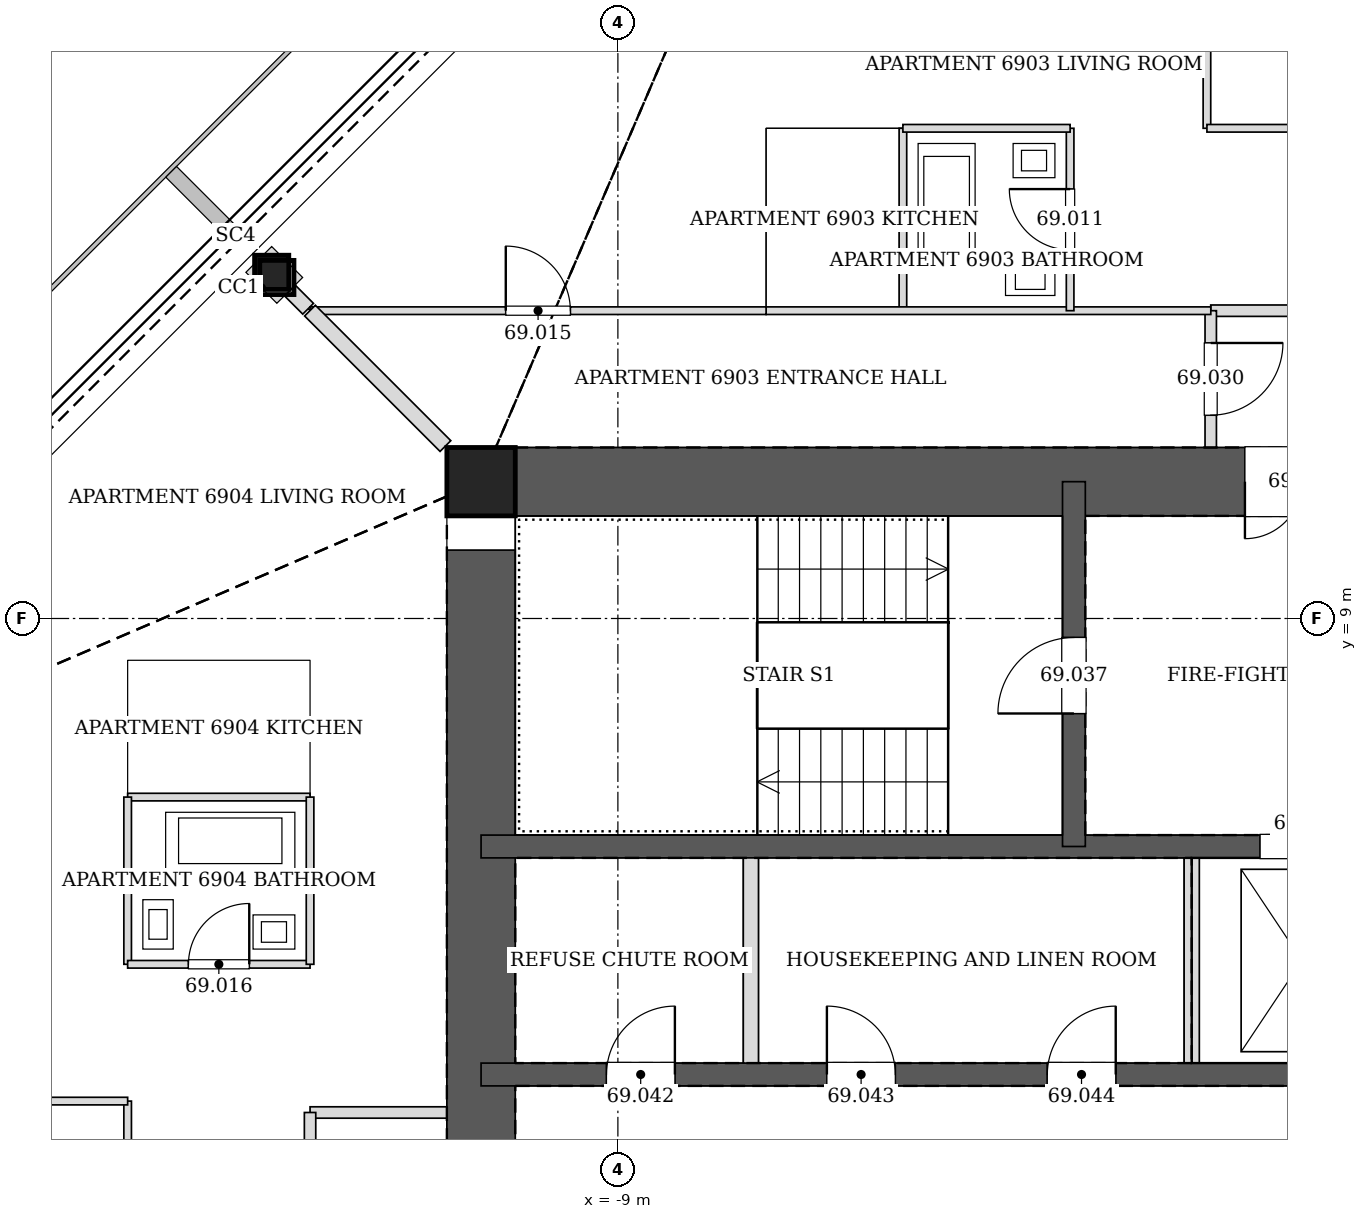
"""IFC4 building model, lengths in metres.
Left out: names, types, materials, properties, quantities, classifications, styles, units other than length and angle.
Written with IfcOpenShell. Run it as: python <this file> out.ifc"""

import sys

from ifc_helpers import new_model, si_unit, direction, frame, frame_2d, origin, origin_2d, place, context, subcontext, project, spatial, rectangle, hollow_rectangle, extrude, element, fill, save


model = new_model("IFC4")
c1 = context("Model", 3, precision=1e-05, world=origin(), true_north=direction((0.0, 1.0)))
c2 = subcontext(c1, "Body", "Model", "MODEL_VIEW")
j1 = project(units=[si_unit("LENGTHUNIT", "METRE"), si_unit("PLANEANGLEUNIT", "RADIAN")], contexts=[c1])
p1 = place(None, origin())
s1 = spatial("IfcSite", under=j1, at=p1, CompositionType="ELEMENT")
p2 = place(p1, origin())
s2 = spatial("IfcBuilding", under=s1, at=p2, CompositionType="ELEMENT")
p3 = place(p2, frame((0.0, 0.0, 284.4)))
s3 = spatial("IfcBuildingStorey", under=s2, at=p3, CompositionType="ELEMENT", Elevation=284.4)
p4 = place(p3, frame((-13.555, 13.555, 0.0), z_axis=(0.020024994503, -0.020024994503, 0.999598919162), x_axis=(0.707106781187, 0.707106781187, 0.0)))
e1 = element("IfcColumn", 1, at=p4, inside=s3, PredefinedType="COLUMN", context=c2, shape_type="SweptSolid", body=[
    extrude(hollow_rectangle(XDim=0.45, YDim=0.45, WallThickness=0.02, at=origin_2d()), origin(), (0.0, 0.0, 1.0), 3.402),
])
p5 = place(p3, frame((-10.8, 10.8, 0.0), z_axis=(0.0, 0.0, 1.0), x_axis=(1.0, 0.0, 0.0)))
e2 = element("IfcColumn", 2, at=p5, inside=s3, PredefinedType="COLUMN", context=c2, shape_type="SweptSolid", body=[
    extrude(hollow_rectangle(XDim=0.9, YDim=0.9, WallThickness=0.04, at=origin_2d()), origin(), (0.0, 0.0, 1.0), 3.4),
])
p6 = place(p3, frame((10.8, 10.8, 0.0), z_axis=(0.0, 0.0, 1.0), x_axis=(-1.0, 0.0, 0.0)))
e3 = element("IfcWall", 3, at=p6, inside=s3, PredefinedType="SOLIDWALL", context=c2, shape_type="SweptSolid", body=[
    extrude(rectangle(XDim=21.6, YDim=0.9, at=frame_2d((10.8, 0.0))), origin(), (0.0, 0.0, 1.0), 3.4),
])
p7 = place(p6, frame((10.05, 0.0, 0.0)))
e4 = element("IfcOpeningElement", 4, at=p7, cuts=e3, PredefinedType="OPENING", context=c2, shape_type="SweptSolid", body=[
    extrude(rectangle(XDim=1.5, YDim=2.1, at=frame_2d((0.75, 1.05))), frame((0.0, 0.46, 0.0), z_axis=(0.0, -1.0, 0.0), x_axis=(1.0, 0.0, 0.0)), (0.0, 0.0, 1.0), 0.92),
])
p8 = place(p3, frame((-10.8, 10.8, 0.0), z_axis=(0.0, 0.0, 1.0), x_axis=(0.0, -1.0, 0.0)))
e5 = element("IfcWall", 5, at=p8, inside=s3, PredefinedType="SOLIDWALL", context=c2, shape_type="SweptSolid", body=[
    extrude(rectangle(XDim=21.6, YDim=0.9, at=frame_2d((10.8, 0.0))), origin(), (0.0, 0.0, 1.0), 3.4),
])
p9 = place(p8, frame((8.7, 0.0, 0.0)))
e6 = element("IfcOpeningElement", 6, at=p9, cuts=e5, PredefinedType="OPENING", context=c2, shape_type="SweptSolid", body=[
    extrude(rectangle(XDim=1.2, YDim=2.1, at=frame_2d((0.6, 1.05))), frame((0.0, 0.46, 0.0), z_axis=(0.0, -1.0, 0.0), x_axis=(1.0, 0.0, 0.0)), (0.0, 0.0, 1.0), 0.92),
])
p10 = place(p8, frame((11.7, 0.0, 0.0)))
e7 = element("IfcOpeningElement", 7, at=p10, cuts=e5, PredefinedType="OPENING", context=c2, shape_type="SweptSolid", body=[
    extrude(rectangle(XDim=1.2, YDim=2.1, at=frame_2d((0.6, 1.05))), frame((0.0, 0.46, 0.0), z_axis=(0.0, -1.0, 0.0), x_axis=(1.0, 0.0, 0.0)), (0.0, 0.0, 1.0), 0.92),
])
p11 = place(p3, frame((-10.8, 3.0, 0.0), z_axis=(0.0, 0.0, 1.0), x_axis=(1.0, 0.0, 0.0)))
e8 = element("IfcWall", 8, at=p11, inside=s3, PredefinedType="SOLIDWALL", context=c2, shape_type="SweptSolid", body=[
    extrude(rectangle(XDim=21.6, YDim=0.3, at=frame_2d((10.8, 0.0))), origin(), (0.0, 0.0, 1.0), 3.4),
])
p12 = place(p11, frame((1.65, 0.0, 0.0)))
e9 = element("IfcOpeningElement", 9, at=p12, cuts=e8, PredefinedType="OPENING", context=c2, shape_type="SweptSolid", body=[
    extrude(rectangle(XDim=0.9, YDim=2.1, at=frame_2d((0.45, 1.05))), frame((0.0, 0.16, 0.0), z_axis=(0.0, -1.0, 0.0), x_axis=(1.0, 0.0, 0.0)), (0.0, 0.0, 1.0), 0.32),
])
p13 = place(p11, frame((4.55, 0.0, 0.0)))
e10 = element("IfcOpeningElement", 10, at=p13, cuts=e8, PredefinedType="OPENING", context=c2, shape_type="SweptSolid", body=[
    extrude(rectangle(XDim=0.9, YDim=2.1, at=frame_2d((0.45, 1.05))), frame((0.0, 0.16, 0.0), z_axis=(0.0, -1.0, 0.0), x_axis=(1.0, 0.0, 0.0)), (0.0, 0.0, 1.0), 0.32),
])
p14 = place(p11, frame((7.45, 0.0, 0.0)))
e11 = element("IfcOpeningElement", 11, at=p14, cuts=e8, PredefinedType="OPENING", context=c2, shape_type="SweptSolid", body=[
    extrude(rectangle(XDim=0.9, YDim=2.1, at=frame_2d((0.45, 1.05))), frame((0.0, 0.16, 0.0), z_axis=(0.0, -1.0, 0.0), x_axis=(1.0, 0.0, 0.0)), (0.0, 0.0, 1.0), 0.32),
])
p15 = place(p11, frame((13.25, 0.0, 0.0)))
e12 = element("IfcOpeningElement", 12, at=p15, cuts=e8, PredefinedType="OPENING", context=c2, shape_type="SweptSolid", body=[
    extrude(rectangle(XDim=0.9, YDim=2.1, at=frame_2d((0.45, 1.05))), frame((0.0, 0.16, 0.0), z_axis=(0.0, -1.0, 0.0), x_axis=(1.0, 0.0, 0.0)), (0.0, 0.0, 1.0), 0.32),
])
p16 = place(p11, frame((16.15, 0.0, 0.0)))
e13 = element("IfcOpeningElement", 13, at=p16, cuts=e8, PredefinedType="OPENING", context=c2, shape_type="SweptSolid", body=[
    extrude(rectangle(XDim=0.9, YDim=2.1, at=frame_2d((0.45, 1.05))), frame((0.0, 0.16, 0.0), z_axis=(0.0, -1.0, 0.0), x_axis=(1.0, 0.0, 0.0)), (0.0, 0.0, 1.0), 0.32),
])
p17 = place(p11, frame((19.05, 0.0, 0.0)))
e14 = element("IfcOpeningElement", 14, at=p17, cuts=e8, PredefinedType="OPENING", context=c2, shape_type="SweptSolid", body=[
    extrude(rectangle(XDim=0.9, YDim=2.1, at=frame_2d((0.45, 1.05))), frame((0.0, 0.16, 0.0), z_axis=(0.0, -1.0, 0.0), x_axis=(1.0, 0.0, 0.0)), (0.0, 0.0, 1.0), 0.32),
])
p18 = place(p3, frame((-10.8, 6.0, 0.0), z_axis=(0.0, 0.0, 1.0), x_axis=(1.0, 0.0, 0.0)))
e15 = element("IfcWall", 15, at=p18, inside=s3, PredefinedType="SOLIDWALL", context=c2, shape_type="SweptSolid", body=[
    extrude(rectangle(XDim=21.6, YDim=0.3, at=frame_2d((10.8, 0.0))), origin(), (0.0, 0.0, 1.0), 3.4),
])
p19 = place(p18, frame((10.25, 0.0, 0.0)))
e16 = element("IfcOpeningElement", 16, at=p19, cuts=e15, PredefinedType="OPENING", context=c2, shape_type="SweptSolid", body=[
    extrude(rectangle(XDim=1.1, YDim=2.1, at=frame_2d((0.55, 1.05))), frame((0.0, 0.16, 0.0), z_axis=(0.0, -1.0, 0.0), x_axis=(1.0, 0.0, 0.0)), (0.0, 0.0, 1.0), 0.32),
])
p20 = place(p3, frame((-3.0, 6.0, 0.0), z_axis=(0.0, 0.0, 1.0), x_axis=(0.0, 1.0, 0.0)))
e17 = element("IfcWall", 17, at=p20, inside=s3, PredefinedType="SOLIDWALL", context=c2, shape_type="SweptSolid", body=[
    extrude(rectangle(XDim=4.8, YDim=0.3, at=frame_2d((2.4, 0.0))), origin(), (0.0, 0.0, 1.0), 3.4),
])
p21 = place(p20, frame((1.75, 0.0, 0.0)))
e18 = element("IfcOpeningElement", 18, at=p21, cuts=e17, PredefinedType="OPENING", context=c2, shape_type="SweptSolid", body=[
    extrude(rectangle(XDim=1.0, YDim=2.1, at=frame_2d((0.5, 1.05))), frame((0.0, 0.16, 0.0), z_axis=(0.0, -1.0, 0.0), x_axis=(1.0, 0.0, 0.0)), (0.0, 0.0, 1.0), 0.32),
])
p22 = place(p3, frame((6.751, 13.05, 0.0), z_axis=(0.0, 0.0, 1.0), x_axis=(-1.0, 0.0, 0.0)))
e19 = element("IfcWall", 19, at=p22, inside=s3, PredefinedType="PARTITIONING", context=c2, shape_type="SweptSolid", body=[
    extrude(rectangle(XDim=7.951, YDim=0.15, at=frame_2d((3.976, 0.0))), origin(), (0.0, 0.0, 1.0), 2.349),
])
p23 = place(p3, frame((-1.2, 13.05, 0.0), z_axis=(0.0, 0.0, 1.0), x_axis=(0.0, -1.0, 0.0)))
e20 = element("IfcWall", 20, at=p23, inside=s3, PredefinedType="PARTITIONING", context=c2, shape_type="SweptSolid", body=[
    extrude(rectangle(XDim=1.8, YDim=0.15, at=frame_2d((0.9, 0.0))), origin(), (0.0, 0.0, 1.0), 3.2),
])
p24 = place(p23, frame((0.425, 0.0, 0.0)))
e21 = element("IfcOpeningElement", 21, at=p24, cuts=e20, PredefinedType="OPENING", context=c2, shape_type="SweptSolid", body=[
    extrude(rectangle(XDim=0.95, YDim=2.1, at=frame_2d((0.475, 1.05))), frame((0.0, 0.085, 0.0), z_axis=(0.0, -1.0, 0.0), x_axis=(1.0, 0.0, 0.0)), (0.0, 0.0, 1.0), 0.17),
])
p25 = place(p3, frame((-11.25, 2.5, 0.0), z_axis=(0.0, 0.0, 1.0), x_axis=(-1.0, 0.0, 0.0)))
e22 = element("IfcWall", 22, at=p25, inside=s3, PredefinedType="PARTITIONING", context=c2, shape_type="SweptSolid", body=[
    extrude(rectangle(XDim=1.8, YDim=0.15, at=frame_2d((0.9, 0.0))), origin(), (0.0, 0.0, 1.0), 3.2),
])
p26 = place(p3, frame((-13.05, 2.5, 0.0), z_axis=(0.0, 0.0, 1.0), x_axis=(0.0, -1.0, 0.0)))
e23 = element("IfcWall", 23, at=p26, inside=s3, PredefinedType="PARTITIONING", context=c2, shape_type="SweptSolid", body=[
    extrude(rectangle(XDim=3.251, YDim=0.15, at=frame_2d((1.625, 0.0))), origin(), (0.0, 0.0, 1.0), 2.349),
])
p27 = place(p26, frame((1.15, 0.0, 0.0)))
e24 = element("IfcOpeningElement", 24, at=p27, cuts=e23, PredefinedType="OPENING", context=c2, shape_type="SweptSolid", body=[
    extrude(rectangle(XDim=0.95, YDim=2.1, at=frame_2d((0.475, 1.05))), frame((0.0, 0.085, 0.0), z_axis=(0.0, -1.0, 0.0), x_axis=(1.0, 0.0, 0.0)), (0.0, 0.0, 1.0), 0.17),
])
p28 = place(p3, frame((-5.25, 13.05, 0.0), z_axis=(0.0, 0.0, 1.0), x_axis=(0.0, 1.0, 0.0)))
e25 = element("IfcWall", 25, at=p28, inside=s3, PredefinedType="PARTITIONING", context=c2, shape_type="SweptSolid", body=[
    extrude(rectangle(XDim=2.4, YDim=0.1, at=frame_2d((1.2, 0.0))), origin(), (0.0, 0.0, 1.0), 2.591),
])
p29 = place(p3, frame((-7.05, 13.05, 0.0), z_axis=(0.0, 0.0, 1.0), x_axis=(1.0, 0.0, 0.0)))
e26 = element("IfcWall", 26, at=p29, inside=s3, PredefinedType="PARTITIONING", context=c2, shape_type="SweptSolid", body=[
    extrude(rectangle(XDim=5.851, YDim=0.1, at=frame_2d((2.926, 0.0))), origin(), (0.0, 0.0, 1.0), 3.2),
])
p30 = place(p3, frame((-3.05, 13.05, 0.0), z_axis=(0.0, 0.0, 1.0), x_axis=(0.0, 1.0, 0.0)))
e27 = element("IfcWall", 27, at=p30, inside=s3, PredefinedType="PARTITIONING", context=c2, shape_type="SweptSolid", body=[
    extrude(rectangle(XDim=2.4, YDim=0.1, at=frame_2d((1.2, 0.0))), origin(), (0.0, 0.0, 1.0), 2.591),
])
p31 = place(p30, frame((0.8, 0.0, 0.0)))
e28 = element("IfcOpeningElement", 28, at=p31, cuts=e27, PredefinedType="OPENING", context=c2, shape_type="SweptSolid", body=[
    extrude(rectangle(XDim=0.8, YDim=2.1, at=frame_2d((0.4, 1.05))), frame((0.0, 0.06, 0.0), z_axis=(0.0, -1.0, 0.0), x_axis=(1.0, 0.0, 0.0)), (0.0, 0.0, 1.0), 0.12),
])
p32 = place(p3, frame((-3.05, 15.45, 0.0), z_axis=(0.0, 0.0, 1.0), x_axis=(-1.0, 0.0, 0.0)))
e29 = element("IfcWall", 29, at=p32, inside=s3, PredefinedType="PARTITIONING", context=c2, shape_type="SweptSolid", body=[
    extrude(rectangle(XDim=2.2, YDim=0.1, at=frame_2d((1.1, 0.0))), origin(), (0.0, 0.0, 1.0), 3.2),
])
p33 = place(p3, frame((-1.25, 19.953, 0.0), z_axis=(0.0, 0.0, 1.0), x_axis=(0.0, -1.0, 0.0)))
e30 = element("IfcWall", 30, at=p33, inside=s3, PredefinedType="PARTITIONING", context=c2, shape_type="SweptSolid", body=[
    extrude(rectangle(XDim=4.503, YDim=0.1, at=frame_2d((2.252, 0.0))), origin(), (0.0, 0.0, 1.0), 2.591),
])
p34 = place(p33, frame((1.689, 0.0, 0.0)))
e31 = element("IfcOpeningElement", 31, at=p34, cuts=e30, PredefinedType="OPENING", context=c2, shape_type="SweptSolid", body=[
    extrude(rectangle(XDim=0.85, YDim=2.1, at=frame_2d((0.425, 1.05))), frame((0.0, 0.06, 0.0), z_axis=(0.0, -1.0, 0.0), x_axis=(1.0, 0.0, 0.0)), (0.0, 0.0, 1.0), 0.12),
])
p35 = place(p3, frame((-1.25, 15.45, 0.0), z_axis=(0.0, 0.0, 1.0), x_axis=(1.0, 0.0, 0.0)))
e32 = element("IfcWall", 32, at=p35, inside=s3, PredefinedType="PARTITIONING", context=c2, shape_type="SweptSolid", body=[
    extrude(rectangle(XDim=4.0, YDim=0.1, at=frame_2d((2.0, 0.0))), origin(), (0.0, 0.0, 1.0), 2.349),
])
p36 = place(p3, frame((-13.314, 13.314, 0.0), z_axis=(0.0, 0.0, 1.0), x_axis=(0.707106781187, -0.707106781187, 0.0)))
e33 = element("IfcWall", 33, at=p36, inside=s3, PredefinedType="PARTITIONING", context=c2, shape_type="SweptSolid", body=[
    extrude(rectangle(XDim=0.338, YDim=0.2, at=frame_2d((0.169, 0.0))), origin(), (0.0, 0.0, 1.0), 2.591),
])
p37 = place(p3, frame((-13.05, 13.05, 0.0), z_axis=(0.0, 0.0, 1.0), x_axis=(1.0, 0.0, 0.0)))
e34 = element("IfcWall", 34, at=p37, inside=s3, PredefinedType="PARTITIONING", context=c2, shape_type="SweptSolid", body=[
    extrude(rectangle(XDim=6.0, YDim=0.1, at=frame_2d((3.0, 0.0))), origin(), (0.0, 0.0, 1.0), 2.497),
])
p38 = place(p37, frame((2.575, 0.0, 0.0)))
e35 = element("IfcOpeningElement", 35, at=p38, cuts=e34, PredefinedType="OPENING", context=c2, shape_type="SweptSolid", body=[
    extrude(rectangle(XDim=0.85, YDim=2.1, at=frame_2d((0.425, 1.05))), frame((0.0, 0.06, 0.0), z_axis=(0.0, -1.0, 0.0), x_axis=(1.0, 0.0, 0.0)), (0.0, 0.0, 1.0), 0.12),
])
p39 = place(p3, frame((-15.45, 6.65, 0.0), z_axis=(0.0, 0.0, 1.0), x_axis=(1.0, 0.0, 0.0)))
e36 = element("IfcWall", 36, at=p39, inside=s3, PredefinedType="PARTITIONING", context=c2, shape_type="SweptSolid", body=[
    extrude(rectangle(XDim=2.4, YDim=0.1, at=frame_2d((1.2, 0.0))), origin(), (0.0, 0.0, 1.0), 2.591),
])
p40 = place(p3, frame((-15.45, 6.65, 0.0), z_axis=(0.0, 0.0, 1.0), x_axis=(0.0, -1.0, 0.0)))
e37 = element("IfcWall", 37, at=p40, inside=s3, PredefinedType="PARTITIONING", context=c2, shape_type="SweptSolid", body=[
    extrude(rectangle(XDim=2.2, YDim=0.1, at=frame_2d((1.1, 0.0))), origin(), (0.0, 0.0, 1.0), 3.2),
])
p41 = place(p3, frame((-15.45, 4.45, 0.0), z_axis=(0.0, 0.0, 1.0), x_axis=(1.0, 0.0, 0.0)))
e38 = element("IfcWall", 38, at=p41, inside=s3, PredefinedType="PARTITIONING", context=c2, shape_type="SweptSolid", body=[
    extrude(rectangle(XDim=2.4, YDim=0.1, at=frame_2d((1.2, 0.0))), origin(), (0.0, 0.0, 1.0), 2.591),
])
p42 = place(p41, frame((0.8, 0.0, 0.0)))
e39 = element("IfcOpeningElement", 39, at=p42, cuts=e38, PredefinedType="OPENING", context=c2, shape_type="SweptSolid", body=[
    extrude(rectangle(XDim=0.8, YDim=2.1, at=frame_2d((0.4, 1.05))), frame((0.0, 0.06, 0.0), z_axis=(0.0, -1.0, 0.0), x_axis=(1.0, 0.0, 0.0)), (0.0, 0.0, 1.0), 0.12),
])
p43 = place(p3, frame((-13.05, 4.45, 0.0), z_axis=(0.0, 0.0, 1.0), x_axis=(0.0, 1.0, 0.0)))
e40 = element("IfcWall", 40, at=p43, inside=s3, PredefinedType="PARTITIONING", context=c2, shape_type="SweptSolid", body=[
    extrude(rectangle(XDim=2.2, YDim=0.1, at=frame_2d((1.1, 0.0))), origin(), (0.0, 0.0, 1.0), 3.2),
])
p44 = place(p3, frame((-15.45, -0.75, 0.0), z_axis=(0.0, 0.0, 1.0), x_axis=(0.0, 1.0, 0.0)))
e41 = element("IfcWall", 41, at=p44, inside=s3, PredefinedType="PARTITIONING", context=c2, shape_type="SweptSolid", body=[
    extrude(rectangle(XDim=3.4, YDim=0.1, at=frame_2d((1.7, 0.0))), origin(), (0.0, 0.0, 1.0), 2.349),
])
p45 = place(p3, frame((-15.45, 2.65, 0.0), z_axis=(0.0, 0.0, 1.0), x_axis=(-1.0, 0.0, 0.0)))
e42 = element("IfcWall", 42, at=p45, inside=s3, PredefinedType="PARTITIONING", context=c2, shape_type="SweptSolid", body=[
    extrude(rectangle(XDim=4.503, YDim=0.1, at=frame_2d((2.252, 0.0))), origin(), (0.0, 0.0, 1.0), 2.591),
])
p46 = place(p45, frame((1.61, 0.0, 0.0)))
e43 = element("IfcOpeningElement", 43, at=p46, cuts=e42, PredefinedType="OPENING", context=c2, shape_type="SweptSolid", body=[
    extrude(rectangle(XDim=0.85, YDim=2.1, at=frame_2d((0.425, 1.05))), frame((0.0, 0.06, 0.0), z_axis=(0.0, -1.0, 0.0), x_axis=(1.0, 0.0, 0.0)), (0.0, 0.0, 1.0), 0.12),
])
p47 = place(p3, frame((-11.269, 11.269, 0.0), z_axis=(0.0, 0.0, 1.0), x_axis=(-0.707106781187, 0.707106781187, 0.0)))
e44 = element("IfcWall", 44, at=p47, inside=s3, PredefinedType="PARTITIONING", context=c2, shape_type="SweptSolid", body=[
    extrude(rectangle(XDim=2.52, YDim=0.2, at=frame_2d((1.26, 0.0))), origin(), (0.0, 0.0, 1.0), 2.591),
])
for number, where, z_axis, x_axis in (
    (45, (-7.25, 3.15, 0.0), (0.0, 0.0, 1.0), (0.0, 1.0, 0.0)),
    (46, (-1.45, 3.15, 0.0), (0.0, 0.0, 1.0), (0.0, 1.0, 0.0)),
):
    element("IfcWall", number, at=place(p3, frame(where, z_axis=z_axis, x_axis=x_axis)), inside=s3, PredefinedType="PARTITIONING", context=c2, shape_type="SweptSolid", body=[
        extrude(rectangle(XDim=2.7, YDim=0.2, at=frame_2d((1.35, 0.0))), origin(), (0.0, 0.0, 1.0), 3.2),
    ])
p48 = place(p31, origin())
e47 = element("IfcDoor", 47, at=p48, inside=s3, OperationType="SINGLE_SWING_RIGHT", PredefinedType="DOOR", context=c2, shape_type="SweptSolid", body=[
    extrude(rectangle(XDim=0.8, YDim=2.1, at=frame_2d((0.4, 1.05))), frame((0.0, 0.025, 0.0), z_axis=(0.0, -1.0, 0.0), x_axis=(1.0, 0.0, 0.0)), (0.0, 0.0, 1.0), 0.05),
])
fill(e28, e47)
p49 = place(p38, origin())
e48 = element("IfcDoor", 48, at=p49, inside=s3, OperationType="SINGLE_SWING_LEFT", PredefinedType="DOOR", context=c2, shape_type="SweptSolid", body=[
    extrude(rectangle(XDim=0.85, YDim=2.1, at=frame_2d((0.425, 1.05))), frame((0.0, 0.025, 0.0), z_axis=(0.0, -1.0, 0.0), x_axis=(1.0, 0.0, 0.0)), (0.0, 0.0, 1.0), 0.05),
])
fill(e35, e48)
p50 = place(p42, origin())
e49 = element("IfcDoor", 49, at=p50, inside=s3, OperationType="SINGLE_SWING_RIGHT", PredefinedType="DOOR", context=c2, shape_type="SweptSolid", body=[
    extrude(rectangle(XDim=0.8, YDim=2.1, at=frame_2d((0.4, 1.05))), frame((0.0, 0.025, 0.0), z_axis=(0.0, -1.0, 0.0), x_axis=(1.0, 0.0, 0.0)), (0.0, 0.0, 1.0), 0.05),
])
fill(e39, e49)
p51 = place(p24, origin())
e50 = element("IfcDoor", 50, at=p51, inside=s3, OperationType="SINGLE_SWING_LEFT", PredefinedType="DOOR", context=c2, shape_type="SweptSolid", body=[
    extrude(rectangle(XDim=0.95, YDim=2.1, at=frame_2d((0.475, 1.05))), frame((0.0, 0.025, 0.0), z_axis=(0.0, -1.0, 0.0), x_axis=(1.0, 0.0, 0.0)), (0.0, 0.0, 1.0), 0.05),
])
fill(e21, e50)
p52 = place(p7, origin())
e51 = element("IfcDoor", 51, at=p52, inside=s3, OperationType="DOUBLE_DOOR_SINGLE_SWING", PredefinedType="DOOR", context=c2, shape_type="SweptSolid", body=[
    extrude(rectangle(XDim=1.5, YDim=2.1, at=frame_2d((0.75, 1.05))), frame((0.0, 0.025, 0.0), z_axis=(0.0, -1.0, 0.0), x_axis=(1.0, 0.0, 0.0)), (0.0, 0.0, 1.0), 0.05),
])
fill(e4, e51)
p53 = place(p21, origin())
e52 = element("IfcDoor", 52, at=p53, inside=s3, OperationType="SINGLE_SWING_LEFT", PredefinedType="DOOR", context=c2, shape_type="SweptSolid", body=[
    extrude(rectangle(XDim=1.0, YDim=2.1, at=frame_2d((0.5, 1.05))), frame((0.0, 0.025, 0.0), z_axis=(0.0, -1.0, 0.0), x_axis=(1.0, 0.0, 0.0)), (0.0, 0.0, 1.0), 0.05),
])
fill(e18, e52)
p54 = place(p12, origin())
e53 = element("IfcDoor", 53, at=p54, inside=s3, OperationType="SINGLE_SWING_RIGHT", PredefinedType="DOOR", context=c2, shape_type="SweptSolid", body=[
    extrude(rectangle(XDim=0.9, YDim=2.1, at=frame_2d((0.45, 1.05))), frame((0.0, 0.025, 0.0), z_axis=(0.0, -1.0, 0.0), x_axis=(1.0, 0.0, 0.0)), (0.0, 0.0, 1.0), 0.05),
])
fill(e9, e53)
p55 = place(p13, origin())
e54 = element("IfcDoor", 54, at=p55, inside=s3, OperationType="SINGLE_SWING_LEFT", PredefinedType="DOOR", context=c2, shape_type="SweptSolid", body=[
    extrude(rectangle(XDim=0.9, YDim=2.1, at=frame_2d((0.45, 1.05))), frame((0.0, 0.025, 0.0), z_axis=(0.0, -1.0, 0.0), x_axis=(1.0, 0.0, 0.0)), (0.0, 0.0, 1.0), 0.05),
])
fill(e10, e54)
p56 = place(p14, origin())
e55 = element("IfcDoor", 55, at=p56, inside=s3, OperationType="SINGLE_SWING_RIGHT", PredefinedType="DOOR", context=c2, shape_type="SweptSolid", body=[
    extrude(rectangle(XDim=0.9, YDim=2.1, at=frame_2d((0.45, 1.05))), frame((0.0, 0.025, 0.0), z_axis=(0.0, -1.0, 0.0), x_axis=(1.0, 0.0, 0.0)), (0.0, 0.0, 1.0), 0.05),
])
fill(e11, e55)
p57 = place(p19, origin())
e56 = element("IfcDoor", 56, at=p57, inside=s3, OperationType="DOUBLE_DOOR_SLIDING", PredefinedType="DOOR", context=c2, shape_type="SweptSolid", body=[
    extrude(rectangle(XDim=1.1, YDim=2.1, at=frame_2d((0.55, 1.05))), frame((0.0, 0.025, 0.0), z_axis=(0.0, -1.0, 0.0), x_axis=(1.0, 0.0, 0.0)), (0.0, 0.0, 1.0), 0.05),
])
fill(e16, e56)
save(model, sys.argv[1])
